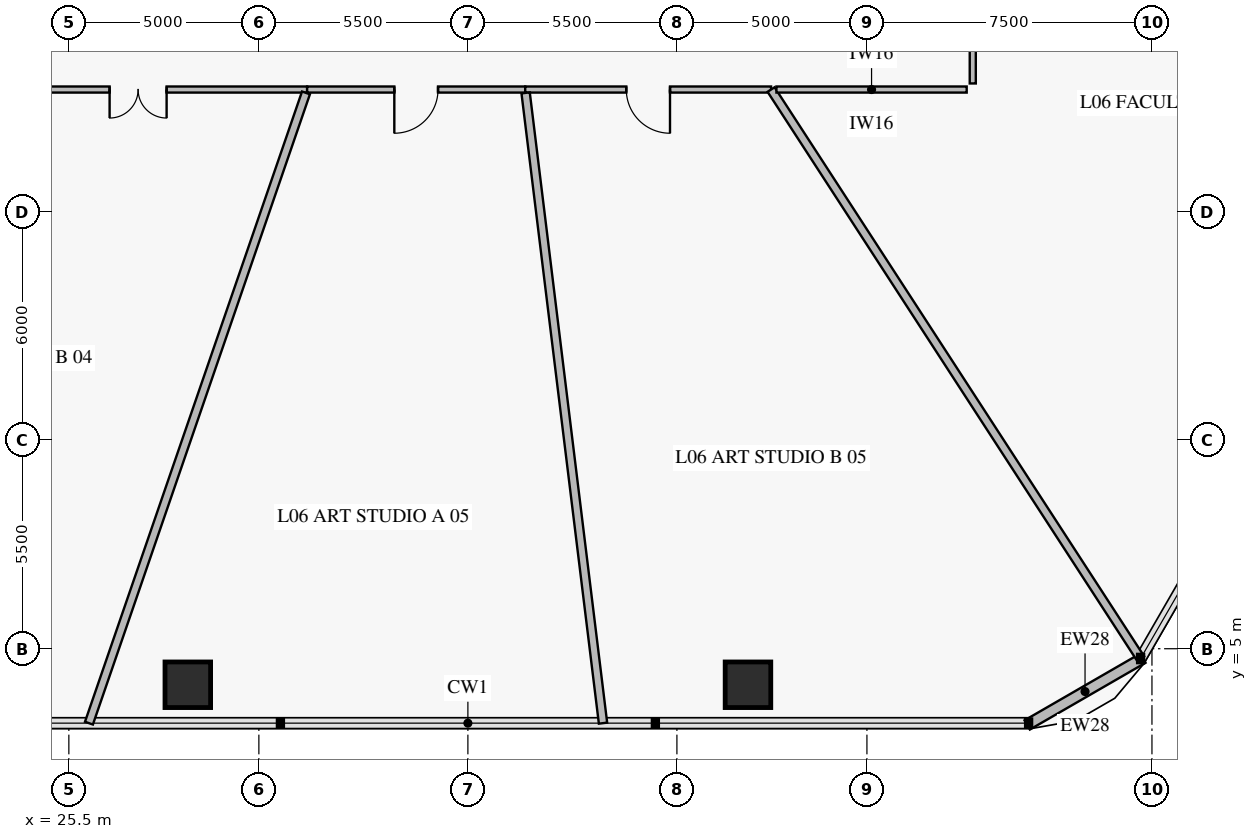
"""IFC4 building model, lengths in metres.
Left out: names, types, materials, properties, quantities, classifications, styles, units other than length and angle.
Written with IfcOpenShell. Run it as: python <this file> out.ifc"""

import sys

from ifc_helpers import new_model, si_unit, direction, frame, frame_2d, origin, origin_2d, place, context, subcontext, project, spatial, rectangle, extrude, element, fill, save


model = new_model("IFC4")
c1 = context("Model", 3, precision=1e-05, world=origin(), true_north=direction((0.0, 1.0)))
c2 = subcontext(c1, "Body", "Model", "MODEL_VIEW")
j1 = project(units=[si_unit("LENGTHUNIT", "METRE"), si_unit("PLANEANGLEUNIT", "RADIAN")], contexts=[c1])
p1 = place(None, origin())
s1 = spatial("IfcSite", under=j1, at=p1, CompositionType="ELEMENT")
p2 = place(p1, origin())
s2 = spatial("IfcBuilding", under=s1, at=p2, CompositionType="ELEMENT")
p3 = place(p2, frame((0.0, 0.0, 24.6)))
s3 = spatial("IfcBuildingStorey", under=s2, at=p3, CompositionType="ELEMENT", Elevation=24.6)
for number, where, z_axis, x_axis in (
    (1, (28.63, 4.052, 0.0), (0.0, 0.0, 1.0), (1.0, 0.0, 0.0)),
    (2, (43.37, 4.052, 0.0), (0.0, 0.0, 1.0), (1.0, 0.0, 0.0)),
):
    element("IfcColumn", number, at=place(p3, frame(where, z_axis=z_axis, x_axis=x_axis)), inside=s3, PredefinedType="COLUMN", context=c2, shape_type="SweptSolid", body=[
        extrude(rectangle(XDim=1.2, YDim=1.2, at=origin_2d()), origin(), (0.0, 0.0, 1.0), 3.92),
    ])
p4 = place(p3, frame((53.761, 4.751, 0.0), z_axis=(0.0, 0.0, 1.0), x_axis=(-0.866007452331, -0.500031091541, 0.0)))
e3 = element("IfcWall", 3, at=p4, inside=s3, PredefinedType="SOLIDWALL", context=c2, shape_type="SweptSolid", body=[
    extrude(rectangle(XDim=3.515, YDim=0.28, at=frame_2d((1.757, 0.0))), origin(), (0.0, 0.0, 1.0), 3.92),
])
p5 = place(p3, frame((22.875, 19.715, 0.0), z_axis=(0.0, 0.0, 1.0), x_axis=(1.0, 0.0, 0.0)))
e4 = element("IfcWall", 4, at=p5, inside=s3, PredefinedType="PARTITIONING", context=c2, shape_type="SweptSolid", body=[
    extrude(rectangle(XDim=8.895, YDim=0.16, at=frame_2d((4.448, 0.0))), origin(), (0.0, 0.0, 1.0), 3.22),
])
p6 = place(p5, frame((3.698, 0.0, 0.0)))
e5 = element("IfcOpeningElement", 5, at=p6, cuts=e4, PredefinedType="OPENING", context=c2, shape_type="SweptSolid", body=[
    extrude(rectangle(XDim=1.5, YDim=2.15, at=frame_2d((0.75, 1.075))), frame((0.0, 0.092, 0.0), z_axis=(0.0, -1.0, 0.0), x_axis=(1.0, 0.0, 0.0)), (0.0, 0.0, 1.0), 0.184),
])
p7 = place(p3, frame((31.77, 19.715, 0.0), z_axis=(0.0, 0.0, 1.0), x_axis=(1.0, 0.0, 0.0)))
e6 = element("IfcWall", 6, at=p7, inside=s3, PredefinedType="PARTITIONING", context=c2, shape_type="SweptSolid", body=[
    extrude(rectangle(XDim=5.738, YDim=0.16, at=frame_2d((2.869, 0.0))), origin(), (0.0, 0.0, 1.0), 3.22),
])
p8 = place(p7, frame((2.294, 0.0, 0.0)))
e7 = element("IfcOpeningElement", 7, at=p8, cuts=e6, PredefinedType="OPENING", context=c2, shape_type="SweptSolid", body=[
    extrude(rectangle(XDim=1.15, YDim=2.2, at=frame_2d((0.575, 1.1))), frame((0.0, 0.092, 0.0), z_axis=(0.0, -1.0, 0.0), x_axis=(1.0, 0.0, 0.0)), (0.0, 0.0, 1.0), 0.184),
])
p9 = place(p3, frame((37.508, 19.715, 0.0), z_axis=(0.0, 0.0, 1.0), x_axis=(1.0, 0.0, 0.0)))
e8 = element("IfcWall", 8, at=p9, inside=s3, PredefinedType="PARTITIONING", context=c2, shape_type="SweptSolid", body=[
    extrude(rectangle(XDim=6.47, YDim=0.16, at=frame_2d((3.235, 0.0))), origin(), (0.0, 0.0, 1.0), 3.22),
])
p10 = place(p9, frame((2.66, 0.0, 0.0)))
e9 = element("IfcOpeningElement", 9, at=p10, cuts=e8, PredefinedType="OPENING", context=c2, shape_type="SweptSolid", body=[
    extrude(rectangle(XDim=1.15, YDim=2.2, at=frame_2d((0.575, 1.1))), frame((0.0, 0.092, 0.0), z_axis=(0.0, -1.0, 0.0), x_axis=(1.0, 0.0, 0.0)), (0.0, 0.0, 1.0), 0.184),
])
p11 = place(p3, frame((49.285, 19.875, 0.0), z_axis=(0.0, 0.0, 1.0), x_axis=(0.0, 1.0, 0.0)))
e10 = element("IfcWall", 10, at=p11, inside=s3, PredefinedType="PARTITIONING", context=c2, shape_type="SweptSolid", body=[
    extrude(rectangle(XDim=7.808, YDim=0.16, at=frame_2d((3.904, 0.0))), origin(), (0.0, 0.0, 1.0), 3.92),
])
p12 = place(p11, frame((3.429, 0.0, 0.0)))
e11 = element("IfcOpeningElement", 11, at=p12, cuts=e10, PredefinedType="OPENING", context=c2, shape_type="SweptSolid", body=[
    extrude(rectangle(XDim=0.95, YDim=2.1, at=frame_2d((0.475, 1.05))), frame((0.0, 0.092, 0.0), z_axis=(0.0, -1.0, 0.0), x_axis=(1.0, 0.0, 0.0)), (0.0, 0.0, 1.0), 0.184),
])
p13 = place(p3, frame((31.74, 19.627, 0.0), z_axis=(0.0, 0.0, 1.0), x_axis=(-0.325561284918, -0.945520940943, 0.0)))
e12 = element("IfcWall", 12, at=p13, inside=s3, PredefinedType="PARTITIONING", context=c2, shape_type="SweptSolid", body=[
    extrude(rectangle(XDim=17.541, YDim=0.22, at=frame_2d((8.771, 0.0))), origin(), (0.0, 0.0, 1.0), 3.17),
])
p14 = place(p3, frame((37.519, 19.627, 0.0), z_axis=(0.0, 0.0, 1.0), x_axis=(0.121865797427, -0.992546587026, 0.0)))
e13 = element("IfcWall", 13, at=p14, inside=s3, PredefinedType="PARTITIONING", context=c2, shape_type="SweptSolid", body=[
    extrude(rectangle(XDim=16.71, YDim=0.22, at=frame_2d((8.355, 0.0))), origin(), (0.0, 0.0, 1.0), 3.17),
])
p15 = place(p3, frame((43.978, 19.715, 0.0), z_axis=(0.0, 0.0, 1.0), x_axis=(0.544630677499, -0.838675995321, 0.0)))
e14 = element("IfcWall", 14, at=p15, inside=s3, PredefinedType="PARTITIONING", context=c2, shape_type="SweptSolid", body=[
    extrude(rectangle(XDim=17.853, YDim=0.22, at=frame_2d((8.926, 0.0))), origin(), (0.0, 0.0, 1.0), 3.17),
])
p16 = place(p3, frame((44.119, 19.715, 0.0), z_axis=(0.0, 0.0, 1.0), x_axis=(1.0, 0.0, 0.0)))
e15 = element("IfcWall", 15, at=p16, inside=s3, PredefinedType="PARTITIONING", context=c2, shape_type="SweptSolid", body=[
    extrude(rectangle(XDim=5.006, YDim=0.16, at=frame_2d((2.503, 0.0))), origin(), (0.0, 0.0, 1.0), 3.22),
])
p17 = place(p6, frame((1.5, 0.0, 0.0), z_axis=(0.0, 0.0, 1.0), x_axis=(-1.0, 0.0, 0.0)))
e16 = element("IfcDoor", 16, at=p17, inside=s3, OperationType="DOUBLE_DOOR_SINGLE_SWING", PredefinedType="DOOR", context=c2, shape_type="SweptSolid", body=[
    extrude(rectangle(XDim=1.5, YDim=2.15, at=frame_2d((0.75, 1.075))), frame((0.0, 0.025, 0.0), z_axis=(0.0, -1.0, 0.0), x_axis=(1.0, 0.0, 0.0)), (0.0, 0.0, 1.0), 0.05),
])
fill(e5, e16)
p18 = place(p8, frame((1.15, 0.0, 0.0), z_axis=(0.0, 0.0, 1.0), x_axis=(-1.0, 0.0, 0.0)))
e17 = element("IfcDoor", 17, at=p18, inside=s3, OperationType="SINGLE_SWING_RIGHT", PredefinedType="DOOR", context=c2, shape_type="SweptSolid", body=[
    extrude(rectangle(XDim=1.15, YDim=2.2, at=frame_2d((0.575, 1.1))), frame((0.0, 0.025, 0.0), z_axis=(0.0, -1.0, 0.0), x_axis=(1.0, 0.0, 0.0)), (0.0, 0.0, 1.0), 0.05),
])
fill(e7, e17)
p19 = place(p10, frame((1.15, 0.0, 0.0), z_axis=(0.0, 0.0, 1.0), x_axis=(-1.0, 0.0, 0.0)))
e18 = element("IfcDoor", 18, at=p19, inside=s3, OperationType="SINGLE_SWING_LEFT", PredefinedType="DOOR", context=c2, shape_type="SweptSolid", body=[
    extrude(rectangle(XDim=1.15, YDim=2.2, at=frame_2d((0.575, 1.1))), frame((0.0, 0.025, 0.0), z_axis=(0.0, -1.0, 0.0), x_axis=(1.0, 0.0, 0.0)), (0.0, 0.0, 1.0), 0.05),
])
fill(e9, e18)
save(model, sys.argv[1])
